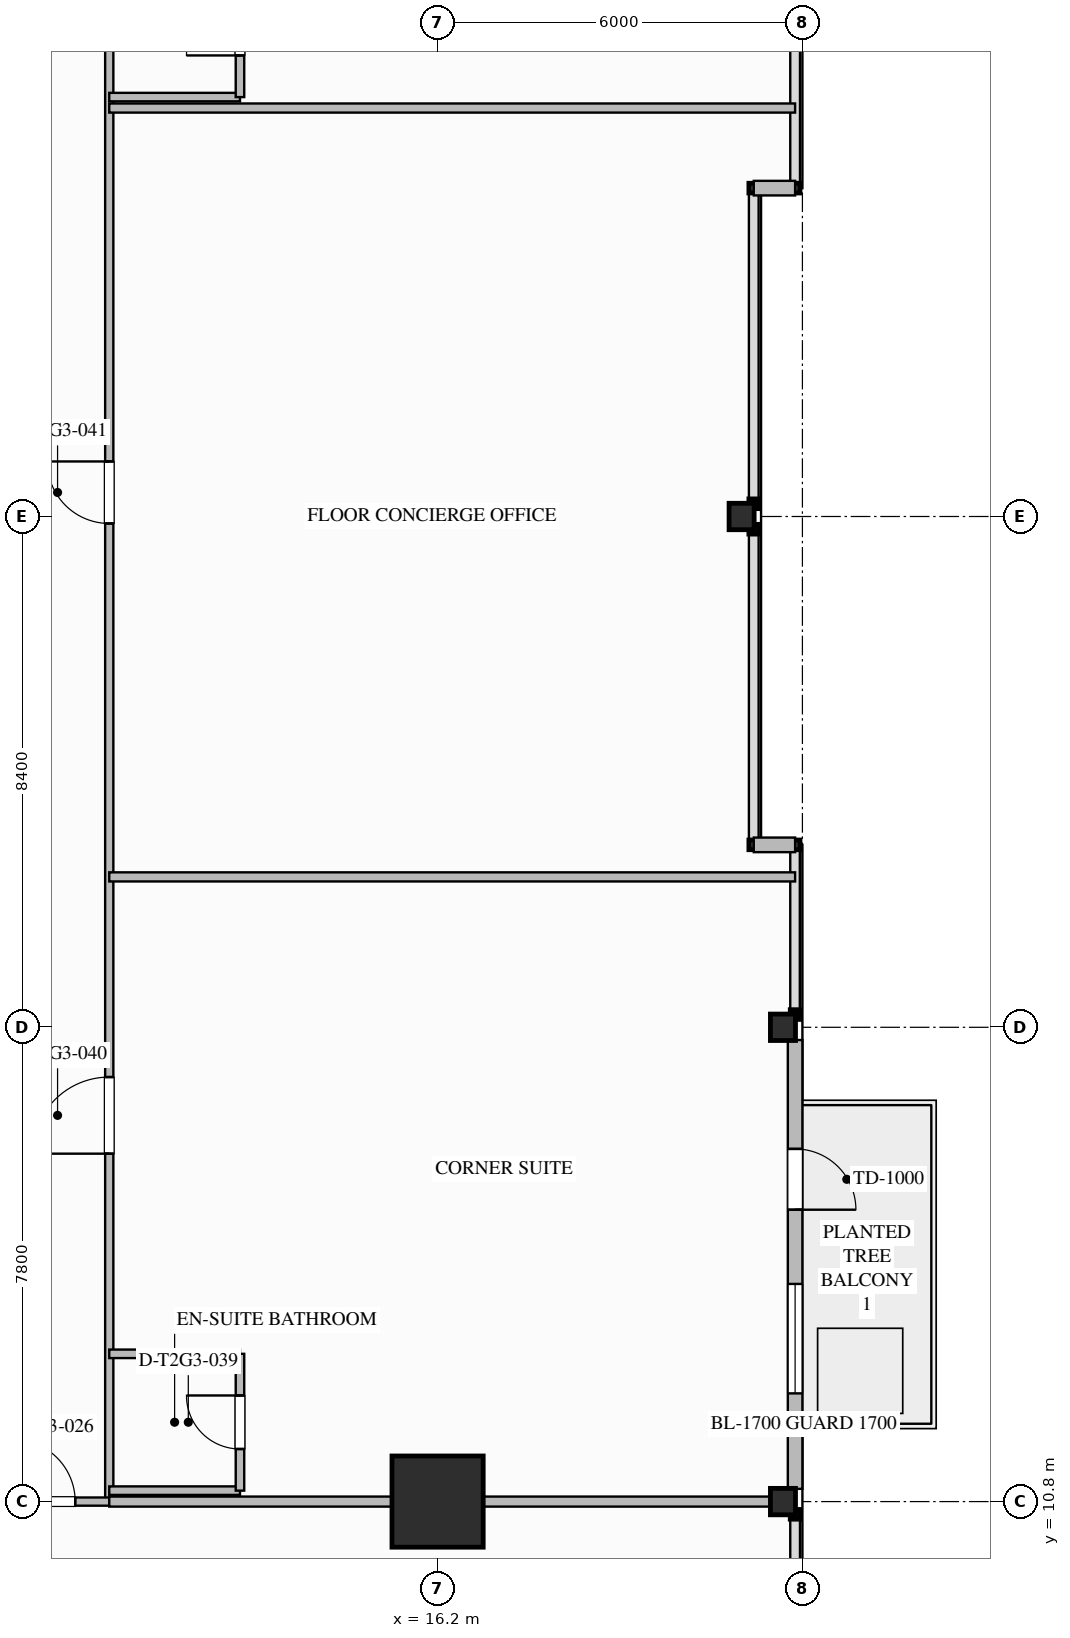
"""IFC4 building model, lengths in metres.
Left out: names, types, materials, properties, quantities, classifications, styles, units other than length and angle.
Written with IfcOpenShell. Run it as: python <this file> out.ifc"""

import sys

from ifc_helpers import new_model, si_unit, direction, frame, frame_2d, origin, origin_2d, place, context, subcontext, project, spatial, rectangle, i_section, extrude, element, fill, save


model = new_model("IFC4")
c1 = context("Model", 3, precision=1e-05, world=origin(), true_north=direction((0.0, 1.0)))
c2 = subcontext(c1, "Body", "Model", "MODEL_VIEW")
j1 = project(units=[si_unit("LENGTHUNIT", "METRE"), si_unit("PLANEANGLEUNIT", "RADIAN")], contexts=[c1])
p1 = place(None, origin())
s1 = spatial("IfcSite", under=j1, at=p1, CompositionType="ELEMENT")
p2 = place(p1, origin())
s2 = spatial("IfcBuilding", under=s1, at=p2, CompositionType="ELEMENT")
p3 = place(p2, frame((0.0, 0.0, 119.8)))
s3 = spatial("IfcBuildingStorey", under=s2, at=p3, CompositionType="ELEMENT", Elevation=119.8)
p4 = place(p3, frame((16.2, 10.8, 0.0), z_axis=(0.0, 0.0, 1.0), x_axis=(1.0, 0.0, 0.0)))
e1 = element("IfcColumn", 1, at=p4, inside=s3, PredefinedType="COLUMN", context=c2, shape_type="SweptSolid", body=[
    extrude(rectangle(XDim=1.5, YDim=1.5, at=origin_2d()), origin(), (0.0, 0.0, 1.0), 3.5),
])
for number, where, z_axis, x_axis in (
    (2, (21.88, 10.8, 0.0), (0.0, 0.0, 1.0), (1.0, 0.0, 0.0)),
    (3, (21.88, 18.6, 0.0), (0.0, 0.0, 1.0), (1.0, 0.0, 0.0)),
    (4, (21.2, 27.0, 0.0), (0.0, 0.0, 1.0), (1.0, 0.0, 0.0)),
):
    element("IfcColumn", number, at=place(p3, frame(where, z_axis=z_axis, x_axis=x_axis)), inside=s3, PredefinedType="COLUMN", context=c2, shape_type="SweptSolid", body=[
        extrude(i_section(OverallWidth=0.412, OverallDepth=0.435, WebThickness=0.036, FlangeThickness=0.057, FilletRadius=0.028, at=origin_2d()), origin(), (0.0, 0.0, 1.0), 3.497),
    ])
p5 = place(p3, frame((22.08, 18.391, 0.0), z_axis=(0.0, 0.0, 1.0), x_axis=(0.0, -1.0, 0.0)))
e5 = element("IfcWall", 5, at=p5, inside=s3, PredefinedType="STANDARD", context=c2, shape_type="SweptSolid", body=[
    extrude(rectangle(XDim=7.381, YDim=0.24, at=frame_2d((3.69, 0.0))), origin(), (0.0, 0.0, 1.0), 2.629),
])
p6 = place(p5, frame((1.791, 0.0, 0.0)))
e6 = element("IfcOpeningElement", 6, at=p6, cuts=e5, PredefinedType="OPENING", context=c2, shape_type="SweptSolid", body=[
    extrude(rectangle(XDim=1.0, YDim=2.2, at=frame_2d((0.5, 1.1))), frame((0.0, 0.13, 0.0), z_axis=(0.0, -1.0, 0.0), x_axis=(1.0, 0.0, 0.0)), (0.0, 0.0, 1.0), 0.26),
])
p7 = place(p5, frame((4.011, 0.0, 0.75)))
e7 = element("IfcOpeningElement", 7, at=p7, cuts=e5, PredefinedType="OPENING", context=c2, shape_type="SweptSolid", body=[
    extrude(rectangle(XDim=1.8, YDim=1.779, at=frame_2d((0.9, 0.89))), frame((0.0, 0.13, 0.0), z_axis=(0.0, -1.0, 0.0), x_axis=(1.0, 0.0, 0.0)), (0.0, 0.0, 1.0), 0.26),
])
for number, where, z_axis, x_axis in (
    (8, (22.08, 32.4, 0.0), (0.0, 0.0, 1.0), (-1.0, 0.0, 0.0)),
    (9, (21.4, 21.6, 0.0), (0.0, 0.0, 1.0), (1.0, 0.0, 0.0)),
):
    element("IfcWall", number, at=place(p3, frame(where, z_axis=z_axis, x_axis=x_axis)), inside=s3, PredefinedType="STANDARD", context=c2, shape_type="SweptSolid", body=[
        extrude(rectangle(XDim=0.68, YDim=0.24, at=frame_2d((0.34, 0.0))), origin(), (0.0, 0.0, 1.0), 3.24),
    ])
p8 = place(p3, frame((10.8, 10.8, 0.0), z_axis=(0.0, 0.0, 1.0), x_axis=(0.0, 1.0, 0.0)))
e10 = element("IfcWall", 10, at=p8, inside=s3, PredefinedType="PARTITIONING", context=c2, shape_type="SweptSolid", body=[
    extrude(rectangle(XDim=32.4, YDim=0.135, at=frame_2d((16.2, 0.0))), origin(), (0.0, 0.0, 1.0), 3.24),
])
p9 = place(p8, frame((5.722, 0.0, 0.0)))
e11 = element("IfcOpeningElement", 11, at=p9, cuts=e10, PredefinedType="OPENING", context=c2, shape_type="SweptSolid", body=[
    extrude(rectangle(XDim=1.26, YDim=2.2, at=frame_2d((0.63, 1.1))), frame((0.0, 0.077, 0.0), z_axis=(0.0, -1.0, 0.0), x_axis=(1.0, 0.0, 0.0)), (0.0, 0.0, 1.0), 0.155),
])
p10 = place(p8, frame((16.085, 0.0, 0.0)))
e12 = element("IfcOpeningElement", 12, at=p10, cuts=e10, PredefinedType="OPENING", context=c2, shape_type="SweptSolid", body=[
    extrude(rectangle(XDim=1.02, YDim=2.15, at=frame_2d((0.51, 1.075))), frame((0.0, 0.077, 0.0), z_axis=(0.0, -1.0, 0.0), x_axis=(1.0, 0.0, 0.0)), (0.0, 0.0, 1.0), 0.155),
])
p11 = place(p8, frame((28.244, 0.0, 0.0)))
e13 = element("IfcOpeningElement", 13, at=p11, cuts=e10, PredefinedType="OPENING", context=c2, shape_type="SweptSolid", body=[
    extrude(rectangle(XDim=1.26, YDim=2.2, at=frame_2d((0.63, 1.1))), frame((0.0, 0.077, 0.0), z_axis=(0.0, -1.0, 0.0), x_axis=(1.0, 0.0, 0.0)), (0.0, 0.0, 1.0), 0.155),
])
p12 = place(p3, frame((8.7, 10.8, 0.0), z_axis=(0.0, 0.0, 1.0), x_axis=(1.0, 0.0, 0.0)))
e14 = element("IfcWall", 14, at=p12, inside=s3, PredefinedType="PARTITIONING", context=c2, shape_type="SweptSolid", body=[
    extrude(rectangle(XDim=2.1, YDim=0.135, at=frame_2d((1.05, 0.0))), origin(), (0.0, 0.0, 1.0), 2.53),
])
p13 = place(p12, frame((0.52, 0.0, 0.0)))
e15 = element("IfcOpeningElement", 15, at=p13, cuts=e14, PredefinedType="OPENING", context=c2, shape_type="SweptSolid", body=[
    extrude(rectangle(XDim=1.02, YDim=2.15, at=frame_2d((0.51, 1.075))), frame((0.0, 0.077, 0.0), z_axis=(0.0, -1.0, 0.0), x_axis=(1.0, 0.0, 0.0)), (0.0, 0.0, 1.0), 0.155),
])
p14 = place(p3, frame((10.8, 10.8, 0.0), z_axis=(0.0, 0.0, 1.0), x_axis=(1.0, 0.0, 0.0)))
e16 = element("IfcWall", 16, at=p14, inside=s3, PredefinedType="PARTITIONING", context=c2, shape_type="SweptSolid", body=[
    extrude(rectangle(XDim=11.28, YDim=0.165, at=frame_2d((5.64, 0.0))), origin(), (0.0, 0.0, 1.0), 2.53),
])
p15 = place(p3, frame((10.8, 10.98, 0.0), z_axis=(0.0, 0.0, 1.0), x_axis=(1.0, 0.0, 0.0)))
e17 = element("IfcWall", 17, at=p15, inside=s3, PredefinedType="PLUMBINGWALL", context=c2, shape_type="SweptSolid", body=[
    extrude(rectangle(XDim=2.15, YDim=0.14, at=frame_2d((1.075, 0.0))), origin(), (0.0, 0.0, 1.0), 2.53),
])
p16 = place(p3, frame((10.8, 13.23, 0.0), z_axis=(0.0, 0.0, 1.0), x_axis=(1.0, 0.0, 0.0)))
e18 = element("IfcWall", 18, at=p16, inside=s3, PredefinedType="PLUMBINGWALL", context=c2, shape_type="SweptSolid", body=[
    extrude(rectangle(XDim=2.15, YDim=0.14, at=frame_2d((1.075, 0.0))), origin(), (0.0, 0.0, 1.0), 3.24),
])
p17 = place(p3, frame((12.95, 10.98, 0.0), z_axis=(0.0, 0.0, 1.0), x_axis=(0.0, 1.0, 0.0)))
e19 = element("IfcWall", 19, at=p17, inside=s3, PredefinedType="PLUMBINGWALL", context=c2, shape_type="SweptSolid", body=[
    extrude(rectangle(XDim=2.25, YDim=0.14, at=frame_2d((1.125, 0.0))), origin(), (0.0, 0.0, 1.0), 3.24),
])
p18 = place(p17, frame((0.685, 0.0, 0.0)))
e20 = element("IfcOpeningElement", 20, at=p18, cuts=e19, PredefinedType="OPENING", context=c2, shape_type="SweptSolid", body=[
    extrude(rectangle(XDim=0.88, YDim=2.1, at=frame_2d((0.44, 1.05))), frame((0.0, 0.08, 0.0), z_axis=(0.0, -1.0, 0.0), x_axis=(1.0, 0.0, 0.0)), (0.0, 0.0, 1.0), 0.16),
])
for number, where, z_axis, x_axis in (
    (21, (10.8, 21.073, 0.0), (0.0, 0.0, 1.0), (1.0, 0.0, 0.0)),
    (22, (10.8, 33.717, 0.0), (0.0, 0.0, 1.0), (1.0, 0.0, 0.0)),
):
    element("IfcWall", number, at=place(p3, frame(where, z_axis=z_axis, x_axis=x_axis)), inside=s3, PredefinedType="PARTITIONING", context=c2, shape_type="SweptSolid", body=[
        extrude(rectangle(XDim=11.28, YDim=0.15, at=frame_2d((5.64, 0.0))), origin(), (0.0, 0.0, 1.0), 3.24),
    ])
p19 = place(p3, frame((10.8, 33.897, 0.0), z_axis=(0.0, 0.0, 1.0), x_axis=(1.0, 0.0, 0.0)))
e23 = element("IfcWall", 23, at=p19, inside=s3, PredefinedType="PLUMBINGWALL", context=c2, shape_type="SweptSolid", body=[
    extrude(rectangle(XDim=2.15, YDim=0.14, at=frame_2d((1.075, 0.0))), origin(), (0.0, 0.0, 1.0), 3.24),
])
p20 = place(p3, frame((12.95, 33.897, 0.0), z_axis=(0.0, 0.0, 1.0), x_axis=(0.0, 1.0, 0.0)))
e24 = element("IfcWall", 24, at=p20, inside=s3, PredefinedType="PLUMBINGWALL", context=c2, shape_type="SweptSolid", body=[
    extrude(rectangle(XDim=2.25, YDim=0.14, at=frame_2d((1.125, 0.0))), origin(), (0.0, 0.0, 1.0), 3.24),
])
p21 = place(p20, frame((0.685, 0.0, 0.0)))
e25 = element("IfcOpeningElement", 25, at=p21, cuts=e24, PredefinedType="OPENING", context=c2, shape_type="SweptSolid", body=[
    extrude(rectangle(XDim=0.88, YDim=2.1, at=frame_2d((0.44, 1.05))), frame((0.0, 0.08, 0.0), z_axis=(0.0, -1.0, 0.0), x_axis=(1.0, 0.0, 0.0)), (0.0, 0.0, 1.0), 0.16),
])
p22 = place(p6, origin())
e26 = element("IfcDoor", 26, at=p22, inside=s3, OperationType="SINGLE_SWING_RIGHT", PredefinedType="DOOR", context=c2, shape_type="SweptSolid", body=[
    extrude(rectangle(XDim=1.0, YDim=2.2, at=frame_2d((0.5, 1.1))), frame((0.0, 0.025, 0.0), z_axis=(0.0, -1.0, 0.0), x_axis=(1.0, 0.0, 0.0)), (0.0, 0.0, 1.0), 0.05),
])
fill(e6, e26)
p23 = place(p7, origin())
e27 = element("IfcWindow", 27, at=p23, inside=s3, PartitioningType="SINGLE_PANEL", PredefinedType="WINDOW", context=c2, shape_type="SweptSolid", body=[
    extrude(rectangle(XDim=1.8, YDim=1.779, at=frame_2d((0.9, 0.89))), frame((0.0, 0.03, 0.0), z_axis=(0.0, -1.0, 0.0), x_axis=(1.0, 0.0, 0.0)), (0.0, 0.0, 1.0), 0.06),
])
fill(e7, e27)
p24 = place(p13, origin())
e28 = element("IfcDoor", 28, at=p24, inside=s3, OperationType="SINGLE_SWING_LEFT", PredefinedType="DOOR", context=c2, shape_type="SweptSolid", body=[
    extrude(rectangle(XDim=1.02, YDim=2.15, at=frame_2d((0.51, 1.075))), frame((0.0, 0.025, 0.0), z_axis=(0.0, -1.0, 0.0), x_axis=(1.0, 0.0, 0.0)), (0.0, 0.0, 1.0), 0.05),
])
fill(e15, e28)
p25 = place(p18, origin())
e29 = element("IfcDoor", 29, at=p25, inside=s3, OperationType="SINGLE_SWING_RIGHT", PredefinedType="DOOR", context=c2, shape_type="SweptSolid", body=[
    extrude(rectangle(XDim=0.88, YDim=2.1, at=frame_2d((0.44, 1.05))), frame((0.0, 0.025, 0.0), z_axis=(0.0, -1.0, 0.0), x_axis=(1.0, 0.0, 0.0)), (0.0, 0.0, 1.0), 0.05),
])
fill(e20, e29)
p26 = place(p9, origin())
e30 = element("IfcDoor", 30, at=p26, inside=s3, OperationType="SINGLE_SWING_LEFT", PredefinedType="DOOR", context=c2, shape_type="SweptSolid", body=[
    extrude(rectangle(XDim=1.26, YDim=2.2, at=frame_2d((0.63, 1.1))), frame((0.0, 0.025, 0.0), z_axis=(0.0, -1.0, 0.0), x_axis=(1.0, 0.0, 0.0)), (0.0, 0.0, 1.0), 0.05),
])
fill(e11, e30)
p27 = place(p10, origin())
e31 = element("IfcDoor", 31, at=p27, inside=s3, OperationType="SINGLE_SWING_RIGHT", PredefinedType="DOOR", context=c2, shape_type="SweptSolid", body=[
    extrude(rectangle(XDim=1.02, YDim=2.15, at=frame_2d((0.51, 1.075))), frame((0.0, 0.025, 0.0), z_axis=(0.0, -1.0, 0.0), x_axis=(1.0, 0.0, 0.0)), (0.0, 0.0, 1.0), 0.05),
])
fill(e12, e31)
p28 = place(p21, origin())
e32 = element("IfcDoor", 32, at=p28, inside=s3, OperationType="SINGLE_SWING_LEFT", PredefinedType="DOOR", context=c2, shape_type="SweptSolid", body=[
    extrude(rectangle(XDim=0.88, YDim=2.1, at=frame_2d((0.44, 1.05))), frame((0.0, 0.025, 0.0), z_axis=(0.0, -1.0, 0.0), x_axis=(1.0, 0.0, 0.0)), (0.0, 0.0, 1.0), 0.05),
])
fill(e25, e32)
save(model, sys.argv[1])
